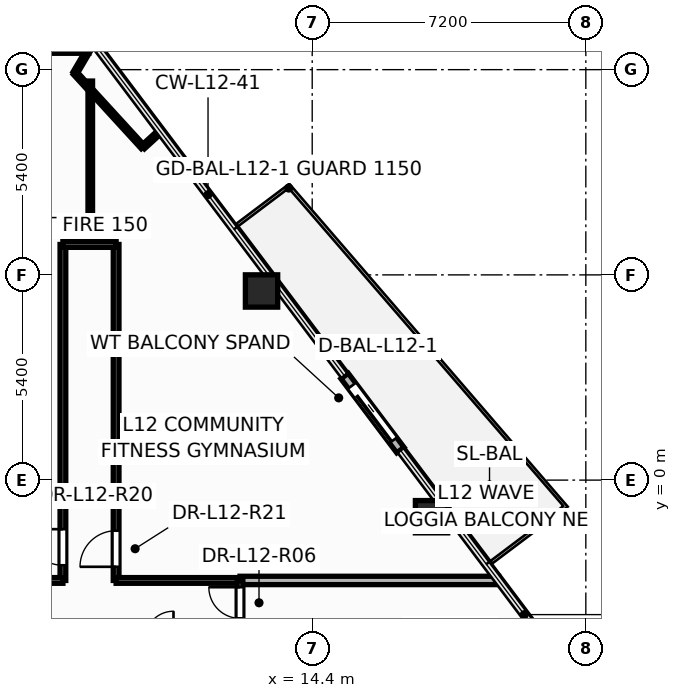
"""IFC4 building model, lengths in metres.
Left out: names, types, materials, properties, quantities, classifications, styles, units other than length and angle.
Written with IfcOpenShell. Run it as: python <this file> out.ifc"""

import sys

from ifc_helpers import new_model, si_unit, direction, frame, frame_2d, origin, origin_2d, place, context, subcontext, project, spatial, rectangle, hollow_rectangle, hollow_circle, extrude, element, fill, save


model = new_model("IFC4")
c1 = context("Model", 3, precision=1e-05, world=origin(), true_north=direction((0.0, 1.0)))
c2 = subcontext(c1, "Body", "Model", "MODEL_VIEW")
j1 = project(units=[si_unit("LENGTHUNIT", "METRE"), si_unit("PLANEANGLEUNIT", "RADIAN")], contexts=[c1])
p1 = place(None, origin())
s1 = spatial("IfcSite", under=j1, at=p1, CompositionType="ELEMENT")
p2 = place(p1, origin())
s2 = spatial("IfcBuilding", under=s1, at=p2, CompositionType="ELEMENT")
p3 = place(p2, frame((0.0, 0.0, 49.5)))
s3 = spatial("IfcBuildingStorey", under=s2, at=p3, CompositionType="ELEMENT", Elevation=49.5)
p4 = place(p3, frame((7.847, 11.906, 0.0), z_axis=(0.0, 0.0, 1.0), x_axis=(1.0, 0.0, 0.0)))
e1 = element("IfcColumn", 1, at=p4, inside=s3, PredefinedType="COLUMN", context=c2, shape_type="SweptSolid", body=[
    extrude(hollow_rectangle(XDim=1.35, YDim=1.35, WallThickness=0.065, at=origin_2d()), origin(), (0.0, 0.0, 1.0), 3.6),
])
for number, where, z_axis, x_axis in (
    (2, (17.54, -0.963, 0.0), (0.0, 0.0, 1.0), (1.0, 0.0, 0.0)),
    (3, (13.066, 4.976, 0.0), (0.0, 0.0, 1.0), (1.0, 0.0, 0.0)),
):
    element("IfcColumn", number, at=place(p3, frame(where, z_axis=z_axis, x_axis=x_axis)), inside=s3, PredefinedType="COLUMN", context=c2, shape_type="SweptSolid", body=[
        extrude(hollow_circle(Radius=0.425, WallThickness=0.038, at=origin_2d()), origin(), (0.0, 0.0, 1.0), 3.6),
    ])
p5 = place(p3, frame((16.72, 0.79, -0.015), z_axis=(0.0, 0.0, 1.0), x_axis=(-0.601647678338, 0.798761585926, 0.0)))
e4 = element("IfcWall", 4, at=p5, inside=s3, PredefinedType="STANDARD", context=c2, shape_type="SweptSolid", body=[
    extrude(rectangle(XDim=2.44, YDim=0.24, at=frame_2d((1.22, 0.0))), origin(), (0.0, 0.0, 1.0), 2.728),
])
p6 = place(p5, frame((0.32, 0.0, 0.015)))
e5 = element("IfcOpeningElement", 5, at=p6, cuts=e4, PredefinedType="OPENING", context=c2, shape_type="SweptSolid", body=[
    extrude(rectangle(XDim=1.806, YDim=2.204, at=frame_2d((0.9, 1.102))), frame((0.0, 0.13, 0.0), z_axis=(0.0, -1.0, 0.0), x_axis=(1.0, 0.0, 0.0)), (0.0, 0.0, 1.0), 0.26),
])
p7 = place(p3, frame((7.84, -2.64, 0.0), z_axis=(0.0, 0.0, 1.0), x_axis=(0.0, 1.0, 0.0)))
e6 = element("IfcWall", 6, at=p7, inside=s3, PredefinedType="PARTITIONING", context=c2, shape_type="SweptSolid", body=[
    extrude(rectangle(XDim=8.84, YDim=0.15, at=frame_2d((4.42, 0.0))), origin(), (0.0, 0.0, 1.0), 2.325),
])
p8 = place(p7, frame((0.399, 0.0, 0.0)))
e7 = element("IfcOpeningElement", 7, at=p8, cuts=e6, PredefinedType="OPENING", context=c2, shape_type="SweptSolid", body=[
    extrude(rectangle(XDim=0.956, YDim=2.104, at=frame_2d((0.475, 1.052))), frame((0.0, 0.085, 0.0), z_axis=(0.0, -1.0, 0.0), x_axis=(1.0, 0.0, 0.0)), (0.0, 0.0, 1.0), 0.17),
])
p9 = place(p3, frame((9.24, -2.64, 0.0), z_axis=(0.0, 0.0, 1.0), x_axis=(0.0, 1.0, 0.0)))
e8 = element("IfcWall", 8, at=p9, inside=s3, PredefinedType="PARTITIONING", context=c2, shape_type="SweptSolid", body=[
    extrude(rectangle(XDim=8.84, YDim=0.15, at=frame_2d((4.42, 0.0))), origin(), (0.0, 0.0, 1.0), 2.325),
])
p10 = place(p9, frame((0.359, 0.0, 0.0)))
e9 = element("IfcOpeningElement", 9, at=p10, cuts=e8, PredefinedType="OPENING", context=c2, shape_type="SweptSolid", body=[
    extrude(rectangle(XDim=0.956, YDim=2.104, at=frame_2d((0.475, 1.052))), frame((0.0, 0.085, 0.0), z_axis=(0.0, -1.0, 0.0), x_axis=(1.0, 0.0, 0.0)), (0.0, 0.0, 1.0), 0.17),
])
p11 = place(p3, frame((12.5, -2.64, 0.0), z_axis=(0.0, 0.0, 1.0), x_axis=(1.0, 0.0, 0.0)))
e10 = element("IfcWall", 10, at=p11, inside=s3, PredefinedType="PARTITIONING", context=c2, shape_type="SweptSolid", body=[
    extrude(rectangle(XDim=6.804, YDim=0.22, at=frame_2d((3.402, 0.0))), origin(), (0.0, 0.0, 1.0), 2.713),
])
p12 = place(p3, frame((-0.138, -2.64, 0.0), z_axis=(0.0, 0.0, 1.0), x_axis=(1.0, 0.0, 0.0)))
e11 = element("IfcWall", 11, at=p12, inside=s3, PredefinedType="PARTITIONING", context=c2, shape_type="SweptSolid", body=[
    extrude(rectangle(XDim=7.978, YDim=0.15, at=frame_2d((3.989, 0.0))), origin(), (0.0, 0.0, 1.0), 2.325),
])
p13 = place(p3, frame((8.56, 6.2, 0.0), z_axis=(0.0, 0.0, 1.0), x_axis=(0.0, 1.0, 0.0)))
e12 = element("IfcWall", 12, at=p13, inside=s3, PredefinedType="PARTITIONING", context=c2, shape_type="SweptSolid", body=[
    extrude(rectangle(XDim=4.3, YDim=0.12, at=frame_2d((2.15, 0.0))), origin(), (0.0, 0.0, 1.0), 2.325),
])
p14 = place(p3, frame((9.24, -2.64, 0.0), z_axis=(0.0, 0.0, 1.0), x_axis=(1.0, 0.0, 0.0)))
e13 = element("IfcWall", 13, at=p14, inside=s3, PredefinedType="PARTITIONING", context=c2, shape_type="SweptSolid", body=[
    extrude(rectangle(XDim=3.26, YDim=0.15, at=frame_2d((1.63, 0.0))), origin(), (0.0, 0.0, 1.0), 3.35),
])
p15 = place(p3, frame((9.946, 8.761, 0.0), z_axis=(0.0, 0.0, 1.0), x_axis=(-0.675323360741, 0.737521768111, 0.0)))
e14 = element("IfcWall", 14, at=p15, inside=s3, PredefinedType="PARTITIONING", context=c2, shape_type="SweptSolid", body=[
    extrude(rectangle(XDim=2.646, YDim=0.12, at=frame_2d((1.323, 0.0))), origin(), (0.0, 0.0, 1.0), 3.35),
])
p16 = place(p3, frame((12.5, -4.24, 0.0), z_axis=(0.0, 0.0, 1.0), x_axis=(0.0, 1.0, 0.0)))
e15 = element("IfcWall", 15, at=p16, inside=s3, PredefinedType="PARTITIONING", context=c2, shape_type="SweptSolid", body=[
    extrude(rectangle(XDim=1.6, YDim=0.15, at=frame_2d((0.8, 0.0))), origin(), (0.0, 0.0, 1.0), 2.325),
])
p17 = place(p16, frame((0.602, 0.0, 0.0)))
e16 = element("IfcOpeningElement", 16, at=p17, cuts=e15, PredefinedType="OPENING", context=c2, shape_type="SweptSolid", body=[
    extrude(rectangle(XDim=0.826, YDim=2.104, at=frame_2d((0.41, 1.052))), frame((0.0, 0.085, 0.0), z_axis=(0.0, -1.0, 0.0), x_axis=(1.0, 0.0, 0.0)), (0.0, 0.0, 1.0), 0.17),
])
p18 = place(p3, frame((8.159, 10.712, 0.0), z_axis=(0.0, 0.0, 1.0), x_axis=(0.506790466981, 0.862069267854, 0.0)))
e17 = element("IfcWall", 17, at=p18, inside=s3, PredefinedType="PARTITIONING", context=c2, shape_type="SweptSolid", body=[
    extrude(rectangle(XDim=0.836, YDim=0.12, at=frame_2d((0.418, 0.0))), origin(), (0.0, 0.0, 1.0), 2.713),
])
p19 = place(p3, frame((7.84, 6.2, 0.0), z_axis=(0.0, 0.0, 1.0), x_axis=(1.0, 0.0, 0.0)))
e18 = element("IfcWall", 18, at=p19, inside=s3, PredefinedType="PARTITIONING", context=c2, shape_type="SweptSolid", body=[
    extrude(rectangle(XDim=1.4, YDim=0.15, at=frame_2d((0.7, 0.0))), origin(), (0.0, 0.0, 1.0), 3.35),
])
p20 = place(p3, frame((10.395, 9.172, 0.0), z_axis=(0.0, 0.0, 1.0), x_axis=(-0.737320634479, -0.675542953462, 0.0)))
e19 = element("IfcWall", 19, at=p20, inside=s3, PredefinedType="PARTITIONING", context=c2, shape_type="SweptSolid", body=[
    extrude(rectangle(XDim=0.609, YDim=0.12, at=frame_2d((0.304, 0.0))), origin(), (0.0, 0.0, 1.0), 2.713),
])
p21 = place(p6, origin())
e20 = element("IfcDoor", 20, at=p21, inside=s3, OperationType="SLIDING_TO_LEFT", PredefinedType="DOOR", context=c2, shape_type="SweptSolid", body=[
    extrude(rectangle(XDim=1.8, YDim=2.2, at=frame_2d((0.9, 1.1))), frame((0.0, 0.025, 0.0), z_axis=(0.0, -1.0, 0.0), x_axis=(1.0, 0.0, 0.0)), (0.0, 0.0, 1.0), 0.05),
])
fill(e5, e20)
p22 = place(p17, origin())
e21 = element("IfcDoor", 21, at=p22, inside=s3, OperationType="SINGLE_SWING_RIGHT", PredefinedType="DOOR", context=c2, shape_type="SweptSolid", body=[
    extrude(rectangle(XDim=0.82, YDim=2.1, at=frame_2d((0.41, 1.05))), frame((0.0, 0.025, 0.0), z_axis=(0.0, -1.0, 0.0), x_axis=(1.0, 0.0, 0.0)), (0.0, 0.0, 1.0), 0.05),
])
fill(e16, e21)
p23 = place(p8, origin())
e22 = element("IfcDoor", 22, at=p23, inside=s3, OperationType="SINGLE_SWING_RIGHT", PredefinedType="DOOR", context=c2, shape_type="SweptSolid", body=[
    extrude(rectangle(XDim=0.95, YDim=2.1, at=frame_2d((0.475, 1.05))), frame((0.0, 0.025, 0.0), z_axis=(0.0, -1.0, 0.0), x_axis=(1.0, 0.0, 0.0)), (0.0, 0.0, 1.0), 0.05),
])
fill(e7, e22)
p24 = place(p10, origin())
e23 = element("IfcDoor", 23, at=p24, inside=s3, OperationType="SINGLE_SWING_LEFT", PredefinedType="DOOR", context=c2, shape_type="SweptSolid", body=[
    extrude(rectangle(XDim=0.95, YDim=2.1, at=frame_2d((0.475, 1.05))), frame((0.0, 0.025, 0.0), z_axis=(0.0, -1.0, 0.0), x_axis=(1.0, 0.0, 0.0)), (0.0, 0.0, 1.0), 0.05),
])
fill(e9, e23)
save(model, sys.argv[1])
